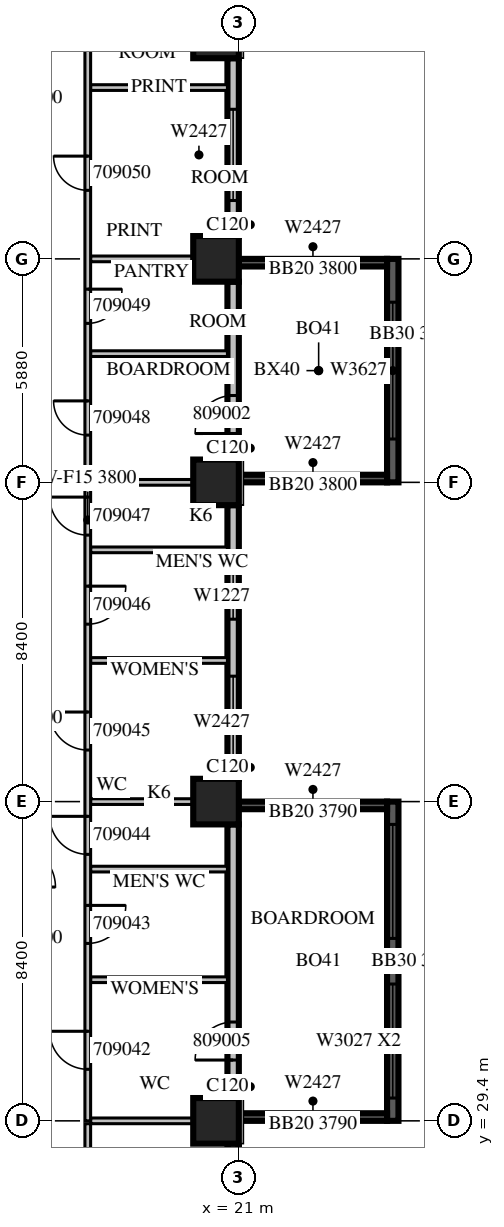
"""IFC4 building model, lengths in metres.
Left out: names, types, materials, properties, quantities, classifications, styles, units other than length and angle.
Written with IfcOpenShell. Run it as: python <this file> out.ifc"""

import sys

from ifc_helpers import new_model, si_unit, direction, frame, frame_2d, origin, origin_2d, place, context, subcontext, project, spatial, rectangle, extrude, source, transform, mapped, element, fill, save


model = new_model("IFC4")
c1 = context("Model", 3, precision=1e-05, world=origin(), true_north=direction((0.0, 1.0)))
c2 = subcontext(c1, "Body", "Model", "MODEL_VIEW")
j1 = project(units=[si_unit("LENGTHUNIT", "METRE"), si_unit("PLANEANGLEUNIT", "RADIAN")], contexts=[c1])
p1 = place(None, origin())
s1 = spatial("IfcSite", under=j1, at=p1, CompositionType="ELEMENT")
p2 = place(p1, origin())
s2 = spatial("IfcBuilding", under=s1, at=p2, CompositionType="ELEMENT")
p3 = place(p2, frame((0.0, 0.0, 48.9)))
s3 = spatial("IfcBuildingStorey", under=s2, at=p3, CompositionType="ELEMENT", Elevation=48.9)
m1 = source(origin(), c2, "Body", "SweptSolid", [
    extrude(rectangle(XDim=1.2, YDim=1.2, at=origin_2d()), origin(), (0.0, 0.0, 1.0), 4.2),
])
for number, where, z_axis, x_axis in (
    (1, (20.4, 29.4, 0.0), (0.0, 0.0, 1.0), (1.0, 0.0, 0.0)),
    (2, (20.4, 37.8, 0.0), (0.0, 0.0, 1.0), (1.0, 0.0, 0.0)),
    (3, (20.4, 46.2, 0.0), (0.0, 0.0, 1.0), (1.0, 0.0, 0.0)),
    (4, (20.4, 52.08, 0.0), (0.0, 0.0, 1.0), (1.0, 0.0, 0.0)),
    (5, (20.4, 57.96, 0.0), (0.0, 0.0, 1.0), (1.0, 0.0, 0.0)),
):
    element("IfcColumn", number, at=place(p3, frame(where, z_axis=z_axis, x_axis=x_axis)), inside=s3, PredefinedType="COLUMN", context=c2, shape_type="MappedRepresentation", body=[
        mapped(m1, transform((0.0, 0.0, 0.0), scale=1.0)),
    ])
m2 = source(origin(), c2, "Body", "SweptSolid", [
    extrude(rectangle(XDim=5.88, YDim=0.3, at=frame_2d((2.94, 0.0))), origin(), (0.0, 0.0, 1.0), 3.8),
])
p4 = place(p3, frame((25.05, 46.2, 0.0), z_axis=(0.0, 0.0, 1.0), x_axis=(0.0, 1.0, 0.0)))
e6 = element("IfcWall", 6, at=p4, inside=s3, PredefinedType="SOLIDWALL", context=c2, shape_type="MappedRepresentation", body=[
    mapped(m2, transform((0.0, 0.0, 0.0), scale=1.0)),
])
m3 = source(origin(), c2, "Body", "SweptSolid", [
    extrude(rectangle(XDim=3.6, YDim=2.7, at=frame_2d((1.8, 1.35))), frame((0.0, 0.16, 0.0), z_axis=(0.0, -1.0, 0.0), x_axis=(1.0, 0.0, 0.0)), (0.0, 0.0, 1.0), 0.32),
])
p5 = place(p4, frame((1.14, 0.0, 0.6)))
e7 = element("IfcOpeningElement", 7, at=p5, cuts=e6, PredefinedType="OPENING", context=c2, shape_type="MappedRepresentation", body=[
    mapped(m3, transform((0.0, 0.0, 0.0), scale=1.0)),
])
m4 = source(origin(), c2, "Body", "SweptSolid", [
    extrude(rectangle(XDim=3.9, YDim=0.2, at=frame_2d((1.95, 0.0))), origin(), (0.0, 0.0, 1.0), 3.8),
])
p6 = place(p3, frame((21.0, 46.3, 0.0), z_axis=(0.0, 0.0, 1.0), x_axis=(1.0, 0.0, 0.0)))
e8 = element("IfcWall", 8, at=p6, inside=s3, PredefinedType="SOLIDWALL", context=c2, shape_type="MappedRepresentation", body=[
    mapped(m4, transform((0.0, 0.0, 0.0), scale=1.0)),
])
m5 = source(origin(), c2, "Body", "SweptSolid", [
    extrude(rectangle(XDim=2.4, YDim=2.7, at=frame_2d((1.2, 1.35))), frame((0.0, 0.11, 0.0), z_axis=(0.0, -1.0, 0.0), x_axis=(1.0, 0.0, 0.0)), (0.0, 0.0, 1.0), 0.22),
])
p7 = place(p6, frame((0.75, 0.0, 0.6)))
e9 = element("IfcOpeningElement", 9, at=p7, cuts=e8, PredefinedType="OPENING", context=c2, shape_type="MappedRepresentation", body=[
    mapped(m5, transform((0.0, 0.0, 0.0), scale=1.0)),
])
p8 = place(p3, frame((21.0, 51.98, 0.0), z_axis=(0.0, 0.0, 1.0), x_axis=(1.0, 0.0, 0.0)))
e10 = element("IfcWall", 10, at=p8, inside=s3, PredefinedType="SOLIDWALL", context=c2, shape_type="MappedRepresentation", body=[
    mapped(m4, transform((0.0, 0.0, 0.0), scale=1.0)),
])
p9 = place(p8, frame((0.75, 0.0, 0.6)))
e11 = element("IfcOpeningElement", 11, at=p9, cuts=e10, PredefinedType="OPENING", context=c2, shape_type="MappedRepresentation", body=[
    mapped(m5, transform((0.0, 0.0, 0.0), scale=1.0)),
])
m6 = source(origin(), c2, "Body", "SweptSolid", [
    extrude(rectangle(XDim=6.6, YDim=0.3, at=frame_2d((3.3, 0.0))), origin(), (0.0, 0.0, 1.0), 3.8),
])
p10 = place(p3, frame((20.85, 22.2, 0.0), z_axis=(0.0, 0.0, 1.0), x_axis=(0.0, 1.0, 0.0)))
e12 = element("IfcWall", 12, at=p10, inside=s3, PredefinedType="STANDARD", context=c2, shape_type="MappedRepresentation", body=[
    mapped(m6, transform((0.0, 0.0, 0.0), scale=1.0)),
])
m7 = source(origin(), c2, "Body", "SweptSolid", [
    extrude(rectangle(XDim=1.2, YDim=2.7, at=frame_2d((0.6, 1.35))), frame((0.0, 0.16, 0.0), z_axis=(0.0, -1.0, 0.0), x_axis=(1.0, 0.0, 0.0)), (0.0, 0.0, 1.0), 0.32),
])
p11 = place(p10, frame((0.3, 0.0, 0.6)))
e13 = element("IfcOpeningElement", 13, at=p11, cuts=e12, PredefinedType="OPENING", context=c2, shape_type="MappedRepresentation", body=[
    mapped(m7, transform((0.0, 0.0, 0.0), scale=1.0)),
])
m8 = source(origin(), c2, "Body", "SweptSolid", [
    extrude(rectangle(XDim=2.4, YDim=2.7, at=frame_2d((1.2, 1.35))), frame((0.0, 0.16, 0.0), z_axis=(0.0, -1.0, 0.0), x_axis=(1.0, 0.0, 0.0)), (0.0, 0.0, 1.0), 0.32),
])
p12 = place(p10, frame((3.9, 0.0, 0.6)))
e14 = element("IfcOpeningElement", 14, at=p12, cuts=e12, PredefinedType="OPENING", context=c2, shape_type="MappedRepresentation", body=[
    mapped(m8, transform((0.0, 0.0, 0.0), scale=1.0)),
])
m9 = source(origin(), c2, "Body", "SweptSolid", [
    extrude(rectangle(XDim=7.2, YDim=0.3, at=frame_2d((3.6, 0.0))), origin(), (0.0, 0.0, 1.0), 3.8),
])
p13 = place(p3, frame((20.85, 30.0, 0.0), z_axis=(0.0, 0.0, 1.0), x_axis=(0.0, 1.0, 0.0)))
e15 = element("IfcWall", 15, at=p13, inside=s3, PredefinedType="STANDARD", context=c2, shape_type="MappedRepresentation", body=[
    mapped(m9, transform((0.0, 0.0, 0.0), scale=1.0)),
])
m10 = source(origin(), c2, "Body", "SweptSolid", [
    extrude(rectangle(XDim=1.0, YDim=2.1, at=frame_2d((0.5, 1.05))), frame((0.0, 0.16, 0.0), z_axis=(0.0, -1.0, 0.0), x_axis=(1.0, 0.0, 0.0)), (0.0, 0.0, 1.0), 0.32),
])
p14 = place(p13, frame((1.0, 0.0, 0.0)))
e16 = element("IfcOpeningElement", 16, at=p14, cuts=e15, PredefinedType="OPENING", context=c2, shape_type="MappedRepresentation", body=[
    mapped(m10, transform((0.0, 0.0, 0.0), scale=1.0)),
])
p15 = place(p3, frame((20.85, 38.4, 0.0), z_axis=(0.0, 0.0, 1.0), x_axis=(0.0, 1.0, 0.0)))
e17 = element("IfcWall", 17, at=p15, inside=s3, PredefinedType="STANDARD", context=c2, shape_type="MappedRepresentation", body=[
    mapped(m9, transform((0.0, 0.0, 0.0), scale=1.0)),
])
p16 = place(p15, frame((0.3, 0.0, 0.6)))
e18 = element("IfcOpeningElement", 18, at=p16, cuts=e17, PredefinedType="OPENING", context=c2, shape_type="MappedRepresentation", body=[
    mapped(m8, transform((0.0, 0.0, 0.0), scale=1.0)),
])
p17 = place(p15, frame((4.199, 0.0, 0.6)))
e19 = element("IfcOpeningElement", 19, at=p17, cuts=e17, PredefinedType="OPENING", context=c2, shape_type="MappedRepresentation", body=[
    mapped(m7, transform((0.0, 0.0, 0.0), scale=1.0)),
])
m11 = source(origin(), c2, "Body", "SweptSolid", [
    extrude(rectangle(XDim=4.68, YDim=0.3, at=frame_2d((2.34, 0.0))), origin(), (0.0, 0.0, 1.0), 3.8),
])
p18 = place(p3, frame((20.85, 46.8, 0.0), z_axis=(0.0, 0.0, 1.0), x_axis=(0.0, 1.0, 0.0)))
e20 = element("IfcWall", 20, at=p18, inside=s3, PredefinedType="STANDARD", context=c2, shape_type="MappedRepresentation", body=[
    mapped(m11, transform((0.0, 0.0, 0.0), scale=1.0)),
])
p19 = place(p18, frame((0.685, 0.0, 0.0)))
e21 = element("IfcOpeningElement", 21, at=p19, cuts=e20, PredefinedType="OPENING", context=c2, shape_type="MappedRepresentation", body=[
    mapped(m10, transform((0.0, 0.0, 0.0), scale=1.0)),
])
p20 = place(p3, frame((20.85, 52.68, 0.0), z_axis=(0.0, 0.0, 1.0), x_axis=(0.0, 1.0, 0.0)))
e22 = element("IfcWall", 22, at=p20, inside=s3, PredefinedType="STANDARD", context=c2, shape_type="MappedRepresentation", body=[
    mapped(m11, transform((0.0, 0.0, 0.0), scale=1.0)),
])
p21 = place(p20, frame((0.936, 0.0, 0.6)))
e23 = element("IfcOpeningElement", 23, at=p21, cuts=e22, PredefinedType="OPENING", context=c2, shape_type="MappedRepresentation", body=[
    mapped(m8, transform((0.0, 0.0, 0.0), scale=1.0)),
])
p22 = place(p3, frame((25.05, 29.4, 0.0), z_axis=(0.0, 0.0, 1.0), x_axis=(0.0, 1.0, 0.0)))
e24 = element("IfcWall", 24, at=p22, inside=s3, PredefinedType="SOLIDWALL", context=c2, shape_type="SweptSolid", body=[
    extrude(rectangle(XDim=8.4, YDim=0.3, at=frame_2d((4.2, 0.0))), origin(), (0.0, 0.0, 1.0), 3.79),
])
m12 = source(origin(), c2, "Body", "SweptSolid", [
    extrude(rectangle(XDim=3.0, YDim=2.7, at=frame_2d((1.5, 1.35))), frame((0.0, 0.16, 0.0), z_axis=(0.0, -1.0, 0.0), x_axis=(1.0, 0.0, 0.0)), (0.0, 0.0, 1.0), 0.32),
])
p23 = place(p22, frame((0.6, 0.0, 0.6)))
e25 = element("IfcOpeningElement", 25, at=p23, cuts=e24, PredefinedType="OPENING", context=c2, shape_type="MappedRepresentation", body=[
    mapped(m12, transform((0.0, 0.0, 0.0), scale=1.0)),
])
p24 = place(p22, frame((4.8, 0.0, 0.6)))
e26 = element("IfcOpeningElement", 26, at=p24, cuts=e24, PredefinedType="OPENING", context=c2, shape_type="MappedRepresentation", body=[
    mapped(m12, transform((0.0, 0.0, 0.0), scale=1.0)),
])
m13 = source(origin(), c2, "Body", "SweptSolid", [
    extrude(rectangle(XDim=3.9, YDim=0.2, at=frame_2d((1.95, 0.0))), origin(), (0.0, 0.0, 1.0), 3.79),
])
p25 = place(p3, frame((21.0, 29.5, 0.0), z_axis=(0.0, 0.0, 1.0), x_axis=(1.0, 0.0, 0.0)))
e27 = element("IfcWall", 27, at=p25, inside=s3, PredefinedType="SOLIDWALL", context=c2, shape_type="MappedRepresentation", body=[
    mapped(m13, transform((0.0, 0.0, 0.0), scale=1.0)),
])
p26 = place(p25, frame((0.75, 0.0, 0.6)))
e28 = element("IfcOpeningElement", 28, at=p26, cuts=e27, PredefinedType="OPENING", context=c2, shape_type="MappedRepresentation", body=[
    mapped(m5, transform((0.0, 0.0, 0.0), scale=1.0)),
])
p27 = place(p3, frame((21.0, 37.7, 0.0), z_axis=(0.0, 0.0, 1.0), x_axis=(1.0, 0.0, 0.0)))
e29 = element("IfcWall", 29, at=p27, inside=s3, PredefinedType="SOLIDWALL", context=c2, shape_type="MappedRepresentation", body=[
    mapped(m13, transform((0.0, 0.0, 0.0), scale=1.0)),
])
p28 = place(p27, frame((0.75, 0.0, 0.6)))
e30 = element("IfcOpeningElement", 30, at=p28, cuts=e29, PredefinedType="OPENING", context=c2, shape_type="MappedRepresentation", body=[
    mapped(m5, transform((0.0, 0.0, 0.0), scale=1.0)),
])
m14 = source(origin(), c2, "Body", "SweptSolid", [
    extrude(rectangle(XDim=5.15, YDim=0.15, at=frame_2d((2.575, 0.0))), origin(), (0.0, 0.0, 1.0), 3.8),
])
p29 = place(p3, frame((17.025, 29.325, 0.0), z_axis=(0.0, 0.0, 1.0), x_axis=(0.0, -1.0, 0.0)))
e31 = element("IfcWall", 31, at=p29, inside=s3, PredefinedType="PARTITIONING", context=c2, shape_type="MappedRepresentation", body=[
    mapped(m14, transform((0.0, 0.0, 0.0), scale=1.0)),
])
m15 = source(origin(), c2, "Body", "SweptSolid", [
    extrude(rectangle(XDim=2.701, YDim=0.15, at=frame_2d((1.351, 0.0))), origin(), (0.0, 0.0, 1.0), 3.8),
])
p30 = place(p3, frame((19.801, 29.4, 0.0), z_axis=(0.0, 0.0, 1.0), x_axis=(-1.0, 0.0, 0.0)))
e32 = element("IfcWall", 32, at=p30, inside=s3, PredefinedType="PARTITIONING", context=c2, shape_type="MappedRepresentation", body=[
    mapped(m15, transform((0.0, 0.0, 0.0), scale=1.0)),
])
m16 = source(origin(), c2, "Body", "SweptSolid", [
    extrude(rectangle(XDim=3.6, YDim=0.15, at=frame_2d((1.8, 0.0))), origin(), (0.0, 0.0, 1.0), 3.8),
])
for number, where, z_axis, x_axis in (
    (33, (17.1, 33.113, 0.0), (0.0, 0.0, 1.0), (1.0, 0.0, 0.0)),
    (34, (17.1, 36.024, 0.0), (0.0, 0.0, 1.0), (1.0, 0.0, 0.0)),
    (35, (17.1, 41.513, 0.0), (0.0, 0.0, 1.0), (1.0, 0.0, 0.0)),
    (36, (17.1, 44.424, 0.0), (0.0, 0.0, 1.0), (1.0, 0.0, 0.0)),
    (37, (17.1, 49.587, 0.0), (0.0, 0.0, 1.0), (1.0, 0.0, 0.0)),
    (38, (17.1, 56.587, 0.0), (0.0, 0.0, 1.0), (1.0, 0.0, 0.0)),
):
    element("IfcWall", number, at=place(p3, frame(where, z_axis=z_axis, x_axis=x_axis)), inside=s3, PredefinedType="PARTITIONING", context=c2, shape_type="MappedRepresentation", body=[
        mapped(m16, transform((0.0, 0.0, 0.0), scale=1.0)),
    ])
for number, where, z_axis, x_axis in (
    (39, (19.801, 37.8, 0.0), (0.0, 0.0, 1.0), (-1.0, 0.0, 0.0)),
    (40, (19.801, 46.2, 0.0), (0.0, 0.0, 1.0), (-1.0, 0.0, 0.0)),
    (41, (19.801, 52.08, 0.0), (0.0, 0.0, 1.0), (-1.0, 0.0, 0.0)),
):
    element("IfcWall", number, at=place(p3, frame(where, z_axis=z_axis, x_axis=x_axis)), inside=s3, PredefinedType="PARTITIONING", context=c2, shape_type="MappedRepresentation", body=[
        mapped(m15, transform((0.0, 0.0, 0.0), scale=1.0)),
    ])
p31 = place(p3, frame((17.025, 61.02, 0.0), z_axis=(0.0, 0.0, 1.0), x_axis=(0.0, -1.0, 0.0)))
e42 = element("IfcWall", 42, at=p31, inside=s3, PredefinedType="PARTITIONING", context=c2, shape_type="SweptSolid", body=[
    extrude(rectangle(XDim=31.62, YDim=0.15, at=frame_2d((15.81, 0.0))), origin(), (0.0, 0.0, 1.0), 3.8),
])
m17 = source(origin(), c2, "Body", "SweptSolid", [
    extrude(rectangle(XDim=1.0, YDim=2.1, at=frame_2d((0.5, 1.05))), frame((0.0, 0.085, 0.0), z_axis=(0.0, -1.0, 0.0), x_axis=(1.0, 0.0, 0.0)), (0.0, 0.0, 1.0), 0.17),
])
p32 = place(p31, frame((29.263, 0.0, 0.0)))
e43 = element("IfcOpeningElement", 43, at=p32, cuts=e42, PredefinedType="OPENING", context=c2, shape_type="MappedRepresentation", body=[
    mapped(m17, transform((0.0, 0.0, 0.0), scale=1.0)),
])
p33 = place(p31, frame((25.951, 0.0, 0.0)))
e44 = element("IfcOpeningElement", 44, at=p33, cuts=e42, PredefinedType="OPENING", context=c2, shape_type="MappedRepresentation", body=[
    mapped(m17, transform((0.0, 0.0, 0.0), scale=1.0)),
])
p34 = place(p31, frame((23.608, 0.0, 0.0)))
e45 = element("IfcOpeningElement", 45, at=p34, cuts=e42, PredefinedType="OPENING", context=c2, shape_type="MappedRepresentation", body=[
    mapped(m17, transform((0.0, 0.0, 0.0), scale=1.0)),
])
p35 = place(p31, frame((20.863, 0.0, 0.0)))
e46 = element("IfcOpeningElement", 46, at=p35, cuts=e42, PredefinedType="OPENING", context=c2, shape_type="MappedRepresentation", body=[
    mapped(m17, transform((0.0, 0.0, 0.0), scale=1.0)),
])
p36 = place(p31, frame((17.551, 0.0, 0.0)))
e47 = element("IfcOpeningElement", 47, at=p36, cuts=e42, PredefinedType="OPENING", context=c2, shape_type="MappedRepresentation", body=[
    mapped(m17, transform((0.0, 0.0, 0.0), scale=1.0)),
])
p37 = place(p31, frame((15.208, 0.0, 0.0)))
e48 = element("IfcOpeningElement", 48, at=p37, cuts=e42, PredefinedType="OPENING", context=c2, shape_type="MappedRepresentation", body=[
    mapped(m17, transform((0.0, 0.0, 0.0), scale=1.0)),
])
m18 = source(origin(), c2, "Body", "SweptSolid", [
    extrude(rectangle(XDim=0.9, YDim=2.1, at=frame_2d((0.45, 1.05))), frame((0.0, 0.085, 0.0), z_axis=(0.0, -1.0, 0.0), x_axis=(1.0, 0.0, 0.0)), (0.0, 0.0, 1.0), 0.17),
])
p38 = place(p31, frame((12.677, 0.0, 0.0)))
e49 = element("IfcOpeningElement", 49, at=p38, cuts=e42, PredefinedType="OPENING", context=c2, shape_type="MappedRepresentation", body=[
    mapped(m18, transform((0.0, 0.0, 0.0), scale=1.0)),
])
p39 = place(p31, frame((9.737, 0.0, 0.0)))
e50 = element("IfcOpeningElement", 50, at=p39, cuts=e42, PredefinedType="OPENING", context=c2, shape_type="MappedRepresentation", body=[
    mapped(m18, transform((0.0, 0.0, 0.0), scale=1.0)),
])
p40 = place(p31, frame((6.236, 0.0, 0.0)))
e51 = element("IfcOpeningElement", 51, at=p40, cuts=e42, PredefinedType="OPENING", context=c2, shape_type="MappedRepresentation", body=[
    mapped(m18, transform((0.0, 0.0, 0.0), scale=1.0)),
])
p41 = place(p31, frame((1.729, 0.0, 0.0)))
e52 = element("IfcOpeningElement", 52, at=p41, cuts=e42, PredefinedType="OPENING", context=c2, shape_type="MappedRepresentation", body=[
    mapped(m18, transform((0.0, 0.0, 0.0), scale=1.0)),
])
m19 = source(origin(), c2, "Body", "SweptSolid", [
    extrude(rectangle(XDim=3.6, YDim=2.7, at=frame_2d((1.8, 1.35))), frame((0.0, 0.03, 0.0), z_axis=(0.0, -1.0, 0.0), x_axis=(1.0, 0.0, 0.0)), (0.0, 0.0, 1.0), 0.06),
])
p42 = place(p5, origin())
e53 = element("IfcWindow", 53, at=p42, inside=s3, PartitioningType="SINGLE_PANEL", PredefinedType="WINDOW", context=c2, shape_type="MappedRepresentation", body=[
    mapped(m19, transform((0.0, 0.0, 0.0), scale=1.0)),
])
fill(e7, e53)
m20 = source(origin(), c2, "Body", "SweptSolid", [
    extrude(rectangle(XDim=2.4, YDim=2.7, at=frame_2d((1.2, 1.35))), frame((0.0, 0.03, 0.0), z_axis=(0.0, -1.0, 0.0), x_axis=(1.0, 0.0, 0.0)), (0.0, 0.0, 1.0), 0.06),
])
p43 = place(p7, origin())
e54 = element("IfcWindow", 54, at=p43, inside=s3, PartitioningType="SINGLE_PANEL", PredefinedType="WINDOW", context=c2, shape_type="MappedRepresentation", body=[
    mapped(m20, transform((0.0, 0.0, 0.0), scale=1.0)),
])
fill(e9, e54)
p44 = place(p9, origin())
e55 = element("IfcWindow", 55, at=p44, inside=s3, PartitioningType="SINGLE_PANEL", PredefinedType="WINDOW", context=c2, shape_type="MappedRepresentation", body=[
    mapped(m20, transform((0.0, 0.0, 0.0), scale=1.0)),
])
fill(e11, e55)
p45 = place(p16, origin())
e56 = element("IfcWindow", 56, at=p45, inside=s3, PartitioningType="SINGLE_PANEL", PredefinedType="WINDOW", context=c2, shape_type="MappedRepresentation", body=[
    mapped(m20, transform((0.0, 0.0, 0.0), scale=1.0)),
])
fill(e18, e56)
m21 = source(origin(), c2, "Body", "SweptSolid", [
    extrude(rectangle(XDim=1.2, YDim=2.7, at=frame_2d((0.6, 1.35))), frame((0.0, 0.03, 0.0), z_axis=(0.0, -1.0, 0.0), x_axis=(1.0, 0.0, 0.0)), (0.0, 0.0, 1.0), 0.06),
])
p46 = place(p17, origin())
e57 = element("IfcWindow", 57, at=p46, inside=s3, PartitioningType="SINGLE_PANEL", PredefinedType="WINDOW", context=c2, shape_type="MappedRepresentation", body=[
    mapped(m21, transform((0.0, 0.0, 0.0), scale=1.0)),
])
fill(e19, e57)
p47 = place(p21, origin())
e58 = element("IfcWindow", 58, at=p47, inside=s3, PartitioningType="SINGLE_PANEL", PredefinedType="WINDOW", context=c2, shape_type="MappedRepresentation", body=[
    mapped(m20, transform((0.0, 0.0, 0.0), scale=1.0)),
])
fill(e23, e58)
m22 = source(origin(), c2, "Body", "SweptSolid", [
    extrude(rectangle(XDim=3.0, YDim=2.7, at=frame_2d((1.5, 1.35))), frame((0.0, 0.03, 0.0), z_axis=(0.0, -1.0, 0.0), x_axis=(1.0, 0.0, 0.0)), (0.0, 0.0, 1.0), 0.06),
])
p48 = place(p23, origin())
e59 = element("IfcWindow", 59, at=p48, inside=s3, PartitioningType="SINGLE_PANEL", PredefinedType="WINDOW", context=c2, shape_type="MappedRepresentation", body=[
    mapped(m22, transform((0.0, 0.0, 0.0), scale=1.0)),
])
fill(e25, e59)
p49 = place(p24, origin())
e60 = element("IfcWindow", 60, at=p49, inside=s3, PartitioningType="SINGLE_PANEL", PredefinedType="WINDOW", context=c2, shape_type="MappedRepresentation", body=[
    mapped(m22, transform((0.0, 0.0, 0.0), scale=1.0)),
])
fill(e26, e60)
p50 = place(p26, origin())
e61 = element("IfcWindow", 61, at=p50, inside=s3, PartitioningType="SINGLE_PANEL", PredefinedType="WINDOW", context=c2, shape_type="MappedRepresentation", body=[
    mapped(m20, transform((0.0, 0.0, 0.0), scale=1.0)),
])
fill(e28, e61)
p51 = place(p28, origin())
e62 = element("IfcWindow", 62, at=p51, inside=s3, PartitioningType="SINGLE_PANEL", PredefinedType="WINDOW", context=c2, shape_type="MappedRepresentation", body=[
    mapped(m20, transform((0.0, 0.0, 0.0), scale=1.0)),
])
fill(e30, e62)
m23 = source(origin(), c2, "Body", "SweptSolid", [
    extrude(rectangle(XDim=1.0, YDim=2.1, at=frame_2d((0.5, 1.05))), frame((0.0, 0.025, 0.0), z_axis=(0.0, -1.0, 0.0), x_axis=(1.0, 0.0, 0.0)), (0.0, 0.0, 1.0), 0.05),
])
p52 = place(p32, origin())
e63 = element("IfcDoor", 63, at=p52, inside=s3, OperationType="SINGLE_SWING_RIGHT", PredefinedType="DOOR", context=c2, shape_type="MappedRepresentation", body=[
    mapped(m23, transform((0.0, 0.0, 0.0), scale=1.0)),
])
fill(e43, e63)
p53 = place(p33, origin())
e64 = element("IfcDoor", 64, at=p53, inside=s3, OperationType="SINGLE_SWING_LEFT", PredefinedType="DOOR", context=c2, shape_type="MappedRepresentation", body=[
    mapped(m23, transform((0.0, 0.0, 0.0), scale=1.0)),
])
fill(e44, e64)
p54 = place(p34, origin())
e65 = element("IfcDoor", 65, at=p54, inside=s3, OperationType="SINGLE_SWING_RIGHT", PredefinedType="DOOR", context=c2, shape_type="MappedRepresentation", body=[
    mapped(m23, transform((0.0, 0.0, 0.0), scale=1.0)),
])
fill(e45, e65)
p55 = place(p35, origin())
e66 = element("IfcDoor", 66, at=p55, inside=s3, OperationType="SINGLE_SWING_RIGHT", PredefinedType="DOOR", context=c2, shape_type="MappedRepresentation", body=[
    mapped(m23, transform((0.0, 0.0, 0.0), scale=1.0)),
])
fill(e46, e66)
p56 = place(p36, origin())
e67 = element("IfcDoor", 67, at=p56, inside=s3, OperationType="SINGLE_SWING_LEFT", PredefinedType="DOOR", context=c2, shape_type="MappedRepresentation", body=[
    mapped(m23, transform((0.0, 0.0, 0.0), scale=1.0)),
])
fill(e47, e67)
p57 = place(p37, origin())
e68 = element("IfcDoor", 68, at=p57, inside=s3, OperationType="SINGLE_SWING_RIGHT", PredefinedType="DOOR", context=c2, shape_type="MappedRepresentation", body=[
    mapped(m23, transform((0.0, 0.0, 0.0), scale=1.0)),
])
fill(e48, e68)
m24 = source(origin(), c2, "Body", "SweptSolid", [
    extrude(rectangle(XDim=0.9, YDim=2.1, at=frame_2d((0.45, 1.05))), frame((0.0, 0.025, 0.0), z_axis=(0.0, -1.0, 0.0), x_axis=(1.0, 0.0, 0.0)), (0.0, 0.0, 1.0), 0.05),
])
p58 = place(p38, origin())
e69 = element("IfcDoor", 69, at=p58, inside=s3, OperationType="SINGLE_SWING_RIGHT", PredefinedType="DOOR", context=c2, shape_type="MappedRepresentation", body=[
    mapped(m24, transform((0.0, 0.0, 0.0), scale=1.0)),
])
fill(e49, e69)
p59 = place(p39, origin())
e70 = element("IfcDoor", 70, at=p59, inside=s3, OperationType="SINGLE_SWING_LEFT", PredefinedType="DOOR", context=c2, shape_type="MappedRepresentation", body=[
    mapped(m24, transform((0.0, 0.0, 0.0), scale=1.0)),
])
fill(e50, e70)
p60 = place(p40, origin())
e71 = element("IfcDoor", 71, at=p60, inside=s3, OperationType="SINGLE_SWING_RIGHT", PredefinedType="DOOR", context=c2, shape_type="MappedRepresentation", body=[
    mapped(m24, transform((0.0, 0.0, 0.0), scale=1.0)),
])
fill(e51, e71)
p61 = place(p19, origin())
e72 = element("IfcDoor", 72, at=p61, inside=s3, OperationType="SINGLE_SWING_LEFT", PredefinedType="DOOR", context=c2, shape_type="MappedRepresentation", body=[
    mapped(m23, transform((0.0, 0.0, 0.0), scale=1.0)),
])
fill(e21, e72)
p62 = place(p14, origin())
e73 = element("IfcDoor", 73, at=p62, inside=s3, OperationType="SINGLE_SWING_LEFT", PredefinedType="DOOR", context=c2, shape_type="MappedRepresentation", body=[
    mapped(m23, transform((0.0, 0.0, 0.0), scale=1.0)),
])
fill(e16, e73)
save(model, sys.argv[1])
